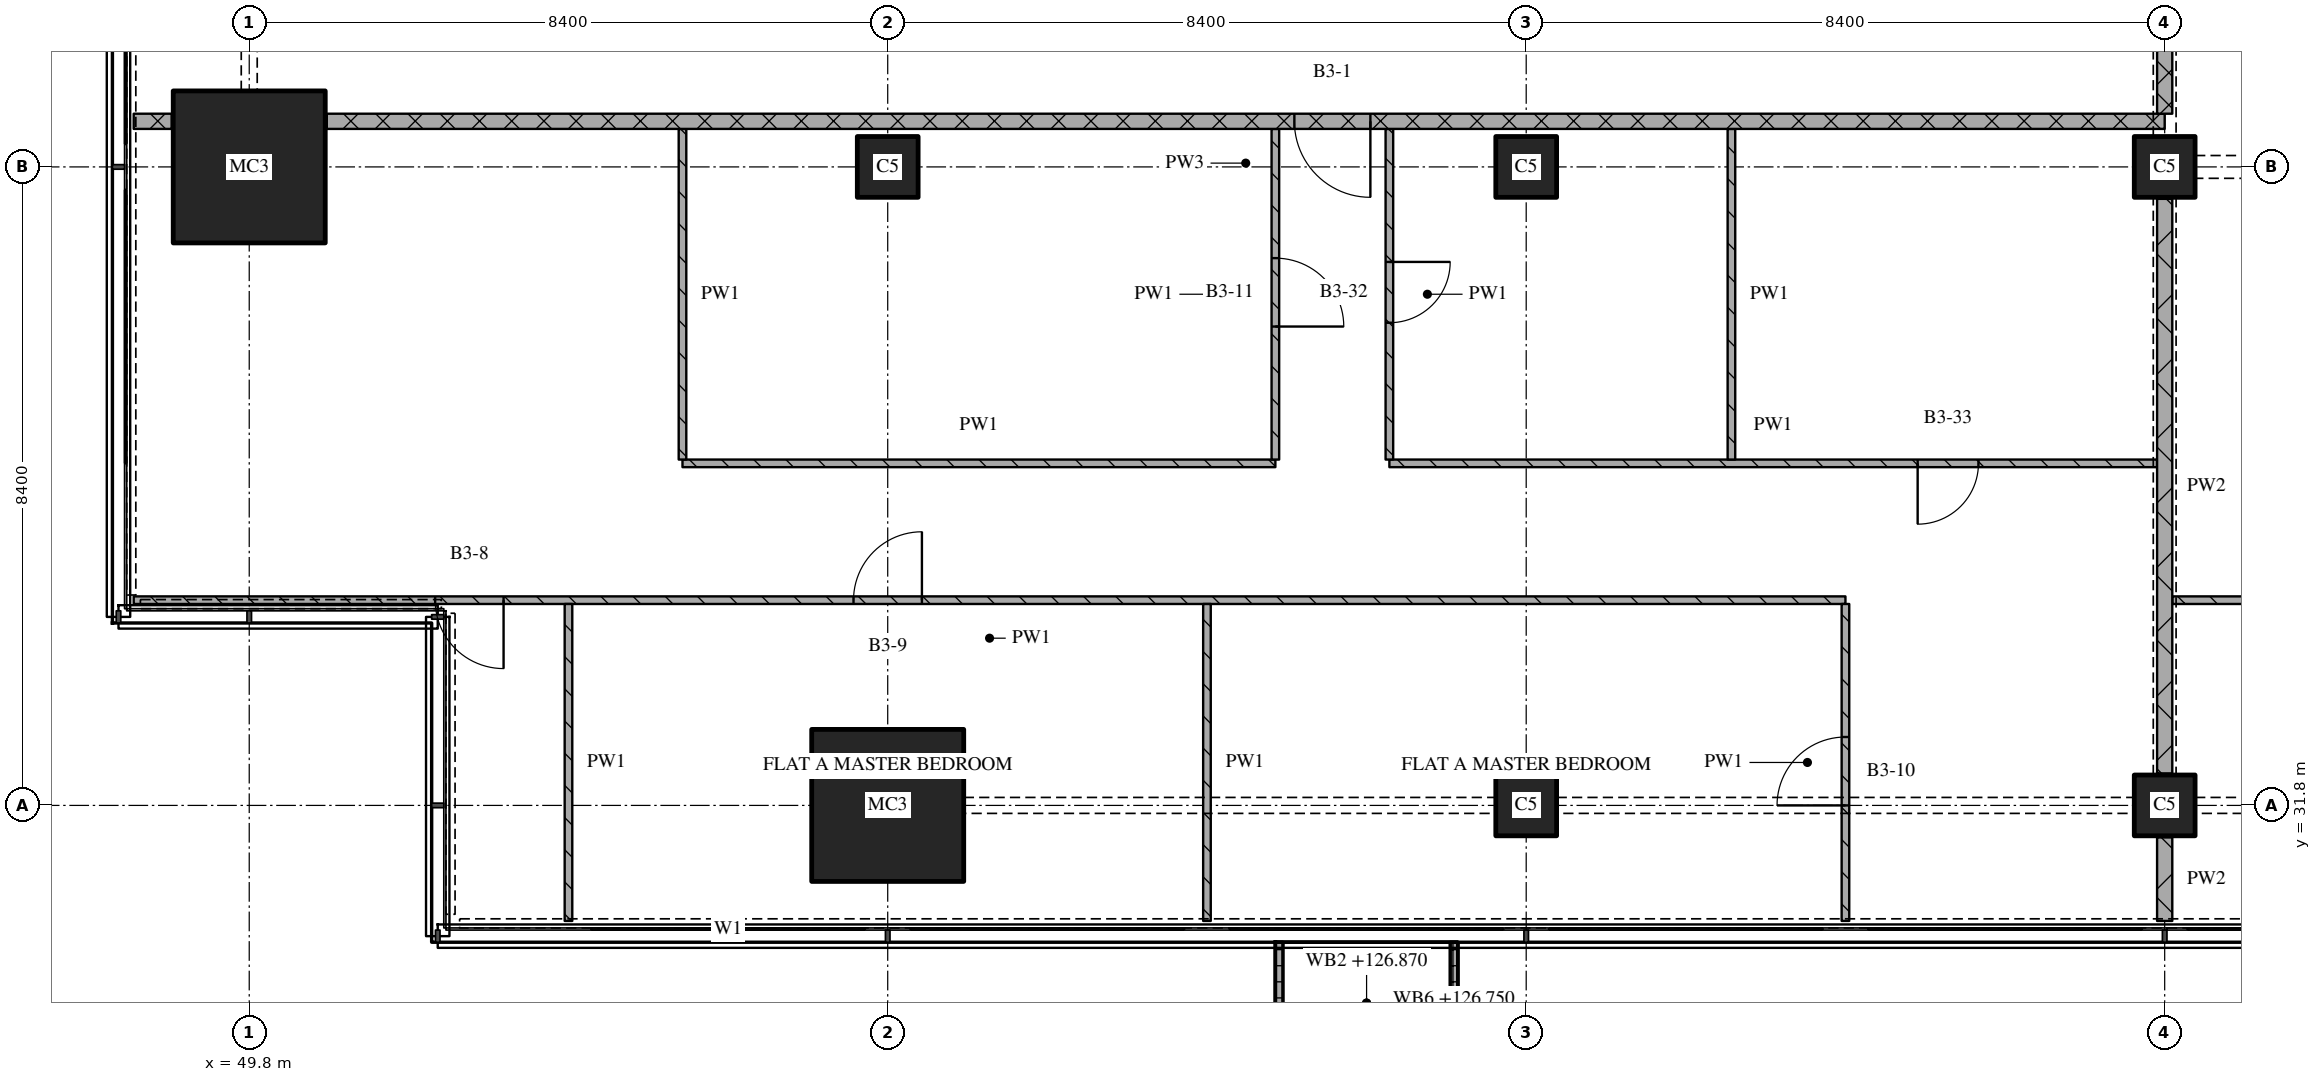
"""IFC4 building model, lengths in metres.
Left out: names, types, materials, properties, quantities, classifications, styles, units other than length and angle.
Written with IfcOpenShell. Run it as: python <this file> out.ifc"""

import sys

from ifc_helpers import new_model, si_unit, direction, frame, frame_2d, origin, origin_2d, place, context, subcontext, project, spatial, polyline, rectangle, outline, extrude, element, fill, save


model = new_model("IFC4")
c1 = context("Model", 3, precision=1e-05, world=origin(), true_north=direction((0.0, 1.0)))
c2 = subcontext(c1, "Body", "Model", "MODEL_VIEW")
j1 = project(units=[si_unit("LENGTHUNIT", "METRE"), si_unit("PLANEANGLEUNIT", "RADIAN")], contexts=[c1])
p1 = place(None, origin())
s1 = spatial("IfcSite", under=j1, at=p1, CompositionType="ELEMENT")
p2 = place(p1, origin())
s2 = spatial("IfcBuilding", under=s1, at=p2, CompositionType="ELEMENT")
p3 = place(p2, frame((0.0, 0.0, 124.05)))
s3 = spatial("IfcBuildingStorey", under=s2, at=p3, CompositionType="ELEMENT", Elevation=124.05)
for number, where, z_axis, x_axis in (
    (1, (49.8, 40.2, 0.0), (0.0, 0.0, 1.0), (1.0, 0.0, 0.0)),
    (2, (58.2, 31.8, 0.0), (0.0, 0.0, 1.0), (1.0, 0.0, 0.0)),
):
    element("IfcColumn", number, at=place(p3, frame(where, z_axis=z_axis, x_axis=x_axis)), inside=s3, PredefinedType="COLUMN", context=c2, shape_type="SweptSolid", body=[
        extrude(rectangle(XDim=2.0, YDim=2.0, at=origin_2d()), origin(), (0.0, 0.0, 1.0), 3.6),
    ])
for number, where, z_axis, x_axis in (
    (3, (58.2, 40.2, 0.0), (0.0, 0.0, 1.0), (1.0, 0.0, 0.0)),
    (4, (66.6, 31.8, 0.0), (0.0, 0.0, 1.0), (1.0, 0.0, 0.0)),
    (5, (66.6, 40.2, 0.0), (0.0, 0.0, 1.0), (1.0, 0.0, 0.0)),
    (6, (75.0, 31.8, 0.0), (0.0, 0.0, 1.0), (1.0, 0.0, 0.0)),
    (7, (75.0, 40.2, 0.0), (0.0, 0.0, 1.0), (1.0, 0.0, 0.0)),
):
    element("IfcColumn", number, at=place(p3, frame(where, z_axis=z_axis, x_axis=x_axis)), inside=s3, PredefinedType="COLUMN", context=c2, shape_type="SweptSolid", body=[
        extrude(rectangle(XDim=0.8, YDim=0.8, at=origin_2d()), origin(), (0.0, 0.0, 1.0), 3.6),
    ])
p4 = place(p3, origin())
e8 = element("IfcWall", 8, at=p4, inside=s3, PredefinedType="SOLIDWALL", context=c2, shape_type="SweptSolid", body=[
    extrude(outline(polyline([(63.3, 30.0), (63.4, 30.0), (63.4, 28.5), (65.6, 28.5), (65.6, 30.0), (65.7, 30.0), (65.7, 28.4), (63.3, 28.4), (63.3, 30.0)])), origin(), (0.0, 0.0, 1.0), 1.0),
])
p5 = place(p3, frame((70.8, 34.5, 0.0), z_axis=(0.0, 0.0, 1.0), x_axis=(-1.0, 0.0, 0.0)))
e9 = element("IfcWall", 9, at=p5, inside=s3, PredefinedType="PARTITIONING", context=c2, shape_type="SweptSolid", body=[
    extrude(rectangle(XDim=22.52, YDim=0.1, at=frame_2d((11.26, 0.0))), origin(), (0.0, 0.0, 1.0), 3.32),
])
p6 = place(p5, frame((12.15, 0.0, 0.0)))
e10 = element("IfcOpeningElement", 10, at=p6, cuts=e9, PredefinedType="OPENING", context=c2, shape_type="SweptSolid", body=[
    extrude(rectangle(XDim=0.9, YDim=2.1, at=frame_2d((0.45, 1.05))), frame((0.0, 0.06, 0.0), z_axis=(0.0, -1.0, 0.0), x_axis=(1.0, 0.0, 0.0)), (0.0, 0.0, 1.0), 0.12),
])
p7 = place(p5, frame((17.654, 0.0, 0.0)))
e11 = element("IfcOpeningElement", 11, at=p7, cuts=e9, PredefinedType="OPENING", context=c2, shape_type="SweptSolid", body=[
    extrude(rectangle(XDim=0.9, YDim=2.1, at=frame_2d((0.45, 1.05))), frame((0.0, 0.06, 0.0), z_axis=(0.0, -1.0, 0.0), x_axis=(1.0, 0.0, 0.0)), (0.0, 0.0, 1.0), 0.12),
])
p8 = place(p3, frame((96.0, 34.5, 0.0), z_axis=(0.0, 0.0, 1.0), x_axis=(-1.0, 0.0, 0.0)))
e12 = element("IfcWall", 12, at=p8, inside=s3, PredefinedType="PARTITIONING", context=c2, shape_type="SweptSolid", body=[
    extrude(rectangle(XDim=20.9, YDim=0.1, at=frame_2d((10.45, 0.0))), origin(), (0.0, 0.0, 1.0), 3.32),
])
p9 = place(p8, frame((10.05, 0.0, 0.0)))
e13 = element("IfcOpeningElement", 13, at=p9, cuts=e12, PredefinedType="OPENING", context=c2, shape_type="SweptSolid", body=[
    extrude(rectangle(XDim=0.9, YDim=2.1, at=frame_2d((0.45, 1.05))), frame((0.0, 0.06, 0.0), z_axis=(0.0, -1.0, 0.0), x_axis=(1.0, 0.0, 0.0)), (0.0, 0.0, 1.0), 0.12),
])
p10 = place(p8, frame((16.35, 0.0, 0.0)))
e14 = element("IfcOpeningElement", 14, at=p10, cuts=e12, PredefinedType="OPENING", context=c2, shape_type="SweptSolid", body=[
    extrude(rectangle(XDim=0.9, YDim=2.1, at=frame_2d((0.45, 1.05))), frame((0.0, 0.06, 0.0), z_axis=(0.0, -1.0, 0.0), x_axis=(1.0, 0.0, 0.0)), (0.0, 0.0, 1.0), 0.12),
])
p11 = place(p3, frame((55.5, 36.3, 0.0), z_axis=(0.0, 0.0, 1.0), x_axis=(1.0, 0.0, 0.0)))
e15 = element("IfcWall", 15, at=p11, inside=s3, PredefinedType="PARTITIONING", context=c2, shape_type="SweptSolid", body=[
    extrude(rectangle(XDim=7.8, YDim=0.1, at=frame_2d((3.9, 0.0))), origin(), (0.0, 0.0, 1.0), 3.32),
])
p12 = place(p3, frame((64.8, 36.3, 0.0), z_axis=(0.0, 0.0, 1.0), x_axis=(1.0, 0.0, 0.0)))
e16 = element("IfcWall", 16, at=p12, inside=s3, PredefinedType="PARTITIONING", context=c2, shape_type="SweptSolid", body=[
    extrude(rectangle(XDim=10.1, YDim=0.1, at=frame_2d((5.05, 0.0))), origin(), (0.0, 0.0, 1.0), 3.32),
])
p13 = place(p12, frame((6.95, 0.0, 0.0)))
e17 = element("IfcOpeningElement", 17, at=p13, cuts=e16, PredefinedType="OPENING", context=c2, shape_type="SweptSolid", body=[
    extrude(rectangle(XDim=0.8, YDim=2.1, at=frame_2d((0.4, 1.05))), frame((0.0, 0.06, 0.0), z_axis=(0.0, -1.0, 0.0), x_axis=(1.0, 0.0, 0.0)), (0.0, 0.0, 1.0), 0.12),
])
p14 = place(p3, frame((48.28, 40.8, 0.0), z_axis=(0.0, 0.0, 1.0), x_axis=(1.0, 0.0, 0.0)))
e18 = element("IfcWall", 18, at=p14, inside=s3, PredefinedType="PARTITIONING", context=c2, shape_type="SweptSolid", body=[
    extrude(rectangle(XDim=0.5, YDim=0.2, at=frame_2d((0.25, 0.0))), origin(), (0.0, 0.0, 1.0), 3.32),
])
p15 = place(p3, frame((75.0, 40.8, 0.0), z_axis=(0.0, 0.0, 1.0), x_axis=(-1.0, 0.0, 0.0)))
e19 = element("IfcWall", 19, at=p15, inside=s3, PredefinedType="PARTITIONING", context=c2, shape_type="SweptSolid", body=[
    extrude(rectangle(XDim=24.18, YDim=0.2, at=frame_2d((12.09, 0.0))), origin(), (0.0, 0.0, 1.0), 3.32),
])
p16 = place(p15, frame((10.45, 0.0, 0.0)))
e20 = element("IfcOpeningElement", 20, at=p16, cuts=e19, PredefinedType="OPENING", context=c2, shape_type="SweptSolid", body=[
    extrude(rectangle(XDim=1.0, YDim=2.1, at=frame_2d((0.5, 1.05))), frame((0.0, 0.11, 0.0), z_axis=(0.0, -1.0, 0.0), x_axis=(1.0, 0.0, 0.0)), (0.0, 0.0, 1.0), 0.22),
])
p17 = place(p3, frame((54.0, 34.45, 0.0), z_axis=(0.0, 0.0, 1.0), x_axis=(0.0, -1.0, 0.0)))
e21 = element("IfcWall", 21, at=p17, inside=s3, PredefinedType="PARTITIONING", context=c2, shape_type="SweptSolid", body=[
    extrude(rectangle(XDim=4.17, YDim=0.1, at=frame_2d((2.085, 0.0))), origin(), (0.0, 0.0, 1.0), 3.32),
])
p18 = place(p3, frame((55.5, 40.7, 0.0), z_axis=(0.0, 0.0, 1.0), x_axis=(0.0, -1.0, 0.0)))
e22 = element("IfcWall", 22, at=p18, inside=s3, PredefinedType="PARTITIONING", context=c2, shape_type="SweptSolid", body=[
    extrude(rectangle(XDim=4.35, YDim=0.1, at=frame_2d((2.175, 0.0))), origin(), (0.0, 0.0, 1.0), 3.32),
])
p19 = place(p3, frame((62.4, 34.45, 0.0), z_axis=(0.0, 0.0, 1.0), x_axis=(0.0, -1.0, 0.0)))
e23 = element("IfcWall", 23, at=p19, inside=s3, PredefinedType="PARTITIONING", context=c2, shape_type="SweptSolid", body=[
    extrude(rectangle(XDim=4.17, YDim=0.1, at=frame_2d((2.085, 0.0))), origin(), (0.0, 0.0, 1.0), 3.32),
])
p20 = place(p3, frame((63.3, 36.35, 0.0), z_axis=(0.0, 0.0, 1.0), x_axis=(0.0, 1.0, 0.0)))
e24 = element("IfcWall", 24, at=p20, inside=s3, PredefinedType="PARTITIONING", context=c2, shape_type="SweptSolid", body=[
    extrude(rectangle(XDim=4.35, YDim=0.1, at=frame_2d((2.175, 0.0))), origin(), (0.0, 0.0, 1.0), 3.32),
])
p21 = place(p20, frame((1.75, 0.0, 0.0)))
e25 = element("IfcOpeningElement", 25, at=p21, cuts=e24, PredefinedType="OPENING", context=c2, shape_type="SweptSolid", body=[
    extrude(rectangle(XDim=0.9, YDim=2.1, at=frame_2d((0.45, 1.05))), frame((0.0, 0.06, 0.0), z_axis=(0.0, -1.0, 0.0), x_axis=(1.0, 0.0, 0.0)), (0.0, 0.0, 1.0), 0.12),
])
p22 = place(p3, frame((64.8, 40.7, 0.0), z_axis=(0.0, 0.0, 1.0), x_axis=(0.0, -1.0, 0.0)))
e26 = element("IfcWall", 26, at=p22, inside=s3, PredefinedType="PARTITIONING", context=c2, shape_type="SweptSolid", body=[
    extrude(rectangle(XDim=4.35, YDim=0.1, at=frame_2d((2.175, 0.0))), origin(), (0.0, 0.0, 1.0), 3.32),
])
p23 = place(p22, frame((1.75, 0.0, 0.0)))
e27 = element("IfcOpeningElement", 27, at=p23, cuts=e26, PredefinedType="OPENING", context=c2, shape_type="SweptSolid", body=[
    extrude(rectangle(XDim=0.8, YDim=2.1, at=frame_2d((0.4, 1.05))), frame((0.0, 0.06, 0.0), z_axis=(0.0, -1.0, 0.0), x_axis=(1.0, 0.0, 0.0)), (0.0, 0.0, 1.0), 0.12),
])
p24 = place(p3, frame((69.3, 40.7, 0.0), z_axis=(0.0, 0.0, 1.0), x_axis=(0.0, -1.0, 0.0)))
e28 = element("IfcWall", 28, at=p24, inside=s3, PredefinedType="PARTITIONING", context=c2, shape_type="SweptSolid", body=[
    extrude(rectangle(XDim=4.35, YDim=0.1, at=frame_2d((2.175, 0.0))), origin(), (0.0, 0.0, 1.0), 3.32),
])
p25 = place(p3, frame((70.8, 30.28, 0.0), z_axis=(0.0, 0.0, 1.0), x_axis=(0.0, 1.0, 0.0)))
e29 = element("IfcWall", 29, at=p25, inside=s3, PredefinedType="PARTITIONING", context=c2, shape_type="SweptSolid", body=[
    extrude(rectangle(XDim=4.17, YDim=0.1, at=frame_2d((2.085, 0.0))), origin(), (0.0, 0.0, 1.0), 3.32),
])
p26 = place(p25, frame((1.52, 0.0, 0.0)))
e30 = element("IfcOpeningElement", 30, at=p26, cuts=e29, PredefinedType="OPENING", context=c2, shape_type="SweptSolid", body=[
    extrude(rectangle(XDim=0.9, YDim=2.1, at=frame_2d((0.45, 1.05))), frame((0.0, 0.06, 0.0), z_axis=(0.0, -1.0, 0.0), x_axis=(1.0, 0.0, 0.0)), (0.0, 0.0, 1.0), 0.12),
])
p27 = place(p3, frame((75.0, 43.1, 0.0), z_axis=(0.0, 0.0, 1.0), x_axis=(0.0, -1.0, 0.0)))
e31 = element("IfcWall", 31, at=p27, inside=s3, PredefinedType="PARTITIONING", context=c2, shape_type="SweptSolid", body=[
    extrude(rectangle(XDim=2.2, YDim=0.2, at=frame_2d((1.1, 0.0))), origin(), (0.0, 0.0, 1.0), 2.43),
])
p28 = place(p3, frame((75.0, 31.38, 0.0), z_axis=(0.0, 0.0, 1.0), x_axis=(0.0, -1.0, 0.0)))
e32 = element("IfcWall", 32, at=p28, inside=s3, PredefinedType="PARTITIONING", context=c2, shape_type="SweptSolid", body=[
    extrude(rectangle(XDim=1.1, YDim=0.2, at=frame_2d((0.55, 0.0))), origin(), (0.0, 0.0, 1.0), 3.32),
])
p29 = place(p3, frame((75.0, 39.78, 0.0), z_axis=(0.0, 0.0, 1.0), x_axis=(0.0, -1.0, 0.0)))
e33 = element("IfcWall", 33, at=p29, inside=s3, PredefinedType="PARTITIONING", context=c2, shape_type="SweptSolid", body=[
    extrude(rectangle(XDim=7.56, YDim=0.2, at=frame_2d((3.78, 0.0))), origin(), (0.0, 0.0, 1.0), 2.83),
])
p30 = place(p6, origin())
e34 = element("IfcDoor", 34, at=p30, inside=s3, OperationType="SINGLE_SWING_RIGHT", PredefinedType="DOOR", context=c2, shape_type="SweptSolid", body=[
    extrude(rectangle(XDim=0.9, YDim=2.1, at=frame_2d((0.45, 1.05))), frame((0.0, 0.025, 0.0), z_axis=(0.0, -1.0, 0.0), x_axis=(1.0, 0.0, 0.0)), (0.0, 0.0, 1.0), 0.05),
])
fill(e10, e34)
p31 = place(p7, origin())
e35 = element("IfcDoor", 35, at=p31, inside=s3, OperationType="SINGLE_SWING_LEFT", PredefinedType="DOOR", context=c2, shape_type="SweptSolid", body=[
    extrude(rectangle(XDim=0.9, YDim=2.1, at=frame_2d((0.45, 1.05))), frame((0.0, 0.025, 0.0), z_axis=(0.0, -1.0, 0.0), x_axis=(1.0, 0.0, 0.0)), (0.0, 0.0, 1.0), 0.05),
])
fill(e11, e35)
p32 = place(p13, origin())
e36 = element("IfcDoor", 36, at=p32, inside=s3, OperationType="SINGLE_SWING_RIGHT", PredefinedType="DOOR", context=c2, shape_type="SweptSolid", body=[
    extrude(rectangle(XDim=0.8, YDim=2.1, at=frame_2d((0.4, 1.05))), frame((0.0, 0.025, 0.0), z_axis=(0.0, -1.0, 0.0), x_axis=(1.0, 0.0, 0.0)), (0.0, 0.0, 1.0), 0.05),
])
fill(e17, e36)
p33 = place(p16, origin())
e37 = element("IfcDoor", 37, at=p33, inside=s3, OperationType="SINGLE_SWING_LEFT", PredefinedType="DOOR", context=c2, shape_type="SweptSolid", body=[
    extrude(rectangle(XDim=1.0, YDim=2.1, at=frame_2d((0.5, 1.05))), frame((0.0, 0.025, 0.0), z_axis=(0.0, -1.0, 0.0), x_axis=(1.0, 0.0, 0.0)), (0.0, 0.0, 1.0), 0.05),
])
fill(e20, e37)
p34 = place(p21, origin())
e38 = element("IfcDoor", 38, at=p34, inside=s3, OperationType="SINGLE_SWING_RIGHT", PredefinedType="DOOR", context=c2, shape_type="SweptSolid", body=[
    extrude(rectangle(XDim=0.9, YDim=2.1, at=frame_2d((0.45, 1.05))), frame((0.0, 0.025, 0.0), z_axis=(0.0, -1.0, 0.0), x_axis=(1.0, 0.0, 0.0)), (0.0, 0.0, 1.0), 0.05),
])
fill(e25, e38)
p35 = place(p23, origin())
e39 = element("IfcDoor", 39, at=p35, inside=s3, OperationType="SINGLE_SWING_LEFT", PredefinedType="DOOR", context=c2, shape_type="SweptSolid", body=[
    extrude(rectangle(XDim=0.8, YDim=2.1, at=frame_2d((0.4, 1.05))), frame((0.0, 0.025, 0.0), z_axis=(0.0, -1.0, 0.0), x_axis=(1.0, 0.0, 0.0)), (0.0, 0.0, 1.0), 0.05),
])
fill(e27, e39)
p36 = place(p26, origin())
e40 = element("IfcDoor", 40, at=p36, inside=s3, OperationType="SINGLE_SWING_LEFT", PredefinedType="DOOR", context=c2, shape_type="SweptSolid", body=[
    extrude(rectangle(XDim=0.9, YDim=2.1, at=frame_2d((0.45, 1.05))), frame((0.0, 0.025, 0.0), z_axis=(0.0, -1.0, 0.0), x_axis=(1.0, 0.0, 0.0)), (0.0, 0.0, 1.0), 0.05),
])
fill(e30, e40)
save(model, sys.argv[1])
